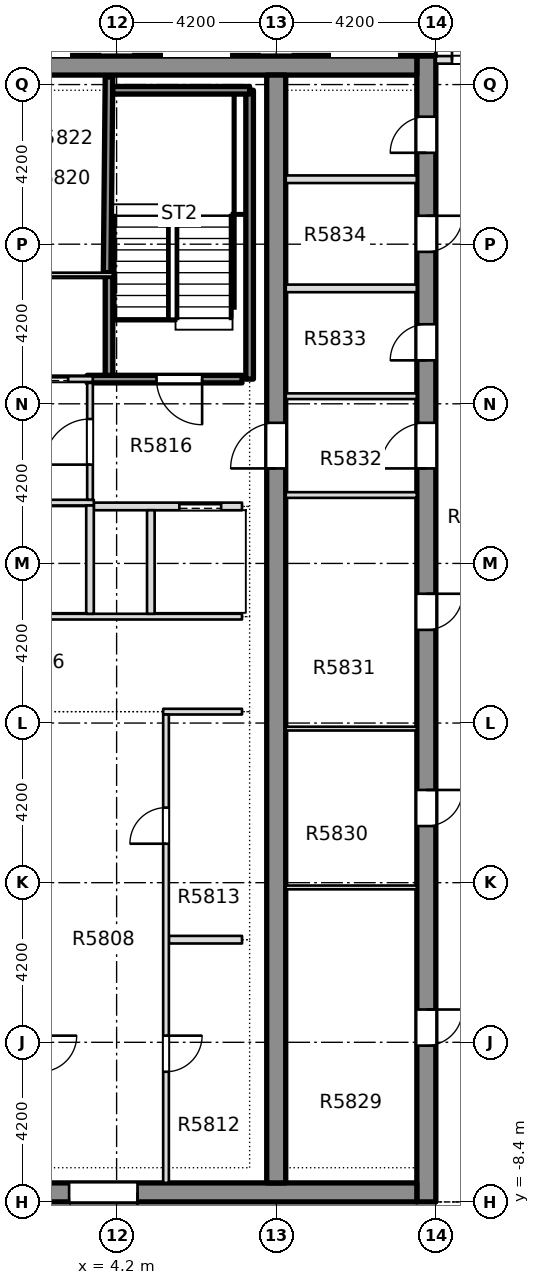
"""IFC4 building model, lengths in metres.
Left out: names, types, materials, properties, quantities, classifications, styles, units other than length and angle.
Written with IfcOpenShell. Run it as: python <this file> out.ifc"""

import sys

from ifc_helpers import new_model, si_unit, direction, frame, frame_2d, origin, place, context, subcontext, project, spatial, rectangle, extrude, element, fill, save


model = new_model("IFC4")
c1 = context("Model", 3, precision=1e-05, world=origin(), true_north=direction((0.0, 1.0)))
c2 = subcontext(c1, "Body", "Model", "MODEL_VIEW")
j1 = project(units=[si_unit("LENGTHUNIT", "METRE"), si_unit("PLANEANGLEUNIT", "RADIAN")], contexts=[c1])
p1 = place(None, origin())
s1 = spatial("IfcSite", under=j1, at=p1, CompositionType="ELEMENT")
p2 = place(p1, origin())
s2 = spatial("IfcBuilding", under=s1, at=p2, CompositionType="ELEMENT")
p3 = place(p2, frame((0.0, 0.0, 223.45)))
s3 = spatial("IfcBuildingStorey", under=s2, at=p3, CompositionType="ELEMENT", Elevation=223.45)
p4 = place(p3, frame((12.35, -8.4, -0.4), z_axis=(0.0, 0.0, 1.0), x_axis=(0.0, 1.0, 0.0)))
e1 = element("IfcWall", 1, at=p4, inside=s3, PredefinedType="SHEAR", context=c2, shape_type="SweptSolid", body=[
    extrude(rectangle(XDim=30.15, YDim=0.5, at=frame_2d((15.075, 0.0))), origin(), (0.0, 0.0, 1.0), 3.45),
])
p5 = place(p4, frame((4.113, 0.0, 0.4)))
e2 = element("IfcOpeningElement", 2, at=p5, cuts=e1, PredefinedType="OPENING", context=c2, shape_type="SweptSolid", body=[
    extrude(rectangle(XDim=0.95, YDim=2.1, at=frame_2d((0.475, 1.05))), frame((0.0, 0.26, 0.0), z_axis=(0.0, -1.0, 0.0), x_axis=(1.0, 0.0, 0.0)), (0.0, 0.0, 1.0), 0.52),
])
p6 = place(p4, frame((9.89, 0.0, 0.4)))
e3 = element("IfcOpeningElement", 3, at=p6, cuts=e1, PredefinedType="OPENING", context=c2, shape_type="SweptSolid", body=[
    extrude(rectangle(XDim=0.95, YDim=2.1, at=frame_2d((0.475, 1.05))), frame((0.0, 0.26, 0.0), z_axis=(0.0, -1.0, 0.0), x_axis=(1.0, 0.0, 0.0)), (0.0, 0.0, 1.0), 0.52),
])
p7 = place(p4, frame((15.052, 0.0, 0.4)))
e4 = element("IfcOpeningElement", 4, at=p7, cuts=e1, PredefinedType="OPENING", context=c2, shape_type="SweptSolid", body=[
    extrude(rectangle(XDim=0.95, YDim=2.1, at=frame_2d((0.475, 1.05))), frame((0.0, 0.26, 0.0), z_axis=(0.0, -1.0, 0.0), x_axis=(1.0, 0.0, 0.0)), (0.0, 0.0, 1.0), 0.52),
])
p8 = place(p4, frame((22.144, 0.0, 0.4)))
e5 = element("IfcOpeningElement", 5, at=p8, cuts=e1, PredefinedType="OPENING", context=c2, shape_type="SweptSolid", body=[
    extrude(rectangle(XDim=0.95, YDim=2.1, at=frame_2d((0.475, 1.05))), frame((0.0, 0.26, 0.0), z_axis=(0.0, -1.0, 0.0), x_axis=(1.0, 0.0, 0.0)), (0.0, 0.0, 1.0), 0.52),
])
p9 = place(p4, frame((24.998, 0.0, 0.4)))
e6 = element("IfcOpeningElement", 6, at=p9, cuts=e1, PredefinedType="OPENING", context=c2, shape_type="SweptSolid", body=[
    extrude(rectangle(XDim=0.95, YDim=2.1, at=frame_2d((0.475, 1.05))), frame((0.0, 0.26, 0.0), z_axis=(0.0, -1.0, 0.0), x_axis=(1.0, 0.0, 0.0)), (0.0, 0.0, 1.0), 0.52),
])
p10 = place(p4, frame((27.605, 0.0, 0.4)))
e7 = element("IfcOpeningElement", 7, at=p10, cuts=e1, PredefinedType="OPENING", context=c2, shape_type="SweptSolid", body=[
    extrude(rectangle(XDim=0.95, YDim=2.1, at=frame_2d((0.475, 1.05))), frame((0.0, 0.26, 0.0), z_axis=(0.0, -1.0, 0.0), x_axis=(1.0, 0.0, 0.0)), (0.0, 0.0, 1.0), 0.52),
])
p11 = place(p4, frame((19.3, 0.0, 0.4)))
e8 = element("IfcOpeningElement", 8, at=p11, cuts=e1, PredefinedType="OPENING", context=c2, shape_type="SweptSolid", body=[
    extrude(rectangle(XDim=1.2, YDim=2.1, at=frame_2d((0.6, 1.05))), frame((0.0, 0.26, 0.0), z_axis=(0.0, -1.0, 0.0), x_axis=(1.0, 0.0, 0.0)), (0.0, 0.0, 1.0), 0.52),
])
p12 = place(p3, frame((-12.1, -8.15, -0.4), z_axis=(0.0, 0.0, 1.0), x_axis=(1.0, 0.0, 0.0)))
e9 = element("IfcWall", 9, at=p12, inside=s3, PredefinedType="SHEAR", context=c2, shape_type="SweptSolid", body=[
    extrude(rectangle(XDim=24.2, YDim=0.5, at=frame_2d((12.1, 0.0))), origin(), (0.0, 0.0, 1.0), 3.45),
])
p13 = place(p12, frame((7.35, 0.0, 0.4)))
e10 = element("IfcOpeningElement", 10, at=p13, cuts=e9, PredefinedType="OPENING", context=c2, shape_type="SweptSolid", body=[
    extrude(rectangle(XDim=1.8, YDim=2.1, at=frame_2d((0.9, 1.05))), frame((0.0, 0.26, 0.0), z_axis=(0.0, -1.0, 0.0), x_axis=(1.0, 0.0, 0.0)), (0.0, 0.0, 1.0), 0.52),
])
p14 = place(p12, frame((15.05, 0.0, 0.4)))
e11 = element("IfcOpeningElement", 11, at=p14, cuts=e9, PredefinedType="OPENING", context=c2, shape_type="SweptSolid", body=[
    extrude(rectangle(XDim=1.8, YDim=2.1, at=frame_2d((0.9, 1.05))), frame((0.0, 0.26, 0.0), z_axis=(0.0, -1.0, 0.0), x_axis=(1.0, 0.0, 0.0)), (0.0, 0.0, 1.0), 0.52),
])
p15 = place(p3, frame((-12.1, 21.5, -0.4), z_axis=(0.0, 0.0, 1.0), x_axis=(1.0, 0.0, 0.0)))
e12 = element("IfcWall", 12, at=p15, inside=s3, PredefinedType="SHEAR", context=c2, shape_type="SweptSolid", body=[
    extrude(rectangle(XDim=24.2, YDim=0.5, at=frame_2d((12.1, 0.0))), origin(), (0.0, 0.0, 1.0), 3.45),
])
p16 = place(p3, frame((8.4, -7.9, -0.4), z_axis=(0.0, 0.0, 1.0), x_axis=(0.0, 1.0, 0.0)))
e13 = element("IfcWall", 13, at=p16, inside=s3, PredefinedType="SHEAR", context=c2, shape_type="SweptSolid", body=[
    extrude(rectangle(XDim=29.15, YDim=0.5, at=frame_2d((14.575, 0.0))), origin(), (0.0, 0.0, 1.0), 3.45),
])
p17 = place(p16, frame((18.8, 0.0, 0.4)))
e14 = element("IfcOpeningElement", 14, at=p17, cuts=e13, PredefinedType="OPENING", context=c2, shape_type="SweptSolid", body=[
    extrude(rectangle(XDim=1.2, YDim=2.1, at=frame_2d((0.6, 1.05))), frame((0.0, 0.26, 0.0), z_axis=(0.0, -1.0, 0.0), x_axis=(1.0, 0.0, 0.0)), (0.0, 0.0, 1.0), 0.52),
])
p18 = place(p3, frame((16.35, 21.65, 0.0), z_axis=(0.0, 0.0, 1.0), x_axis=(-1.0, 0.0, 0.0)))
e15 = element("IfcWall", 15, at=p18, inside=s3, PredefinedType="STANDARD", context=c2, shape_type="SweptSolid", body=[
    extrude(rectangle(XDim=3.75, YDim=0.2, at=frame_2d((1.875, 0.0))), origin(), (0.0, 0.0, 1.0), 3.05),
])
p19 = place(p18, frame((2.325, 0.0, 0.0)))
e16 = element("IfcOpeningElement", 16, at=p19, cuts=e15, PredefinedType="OPENING", context=c2, shape_type="SweptSolid", body=[
    extrude(rectangle(XDim=1.0, YDim=2.4, at=frame_2d((0.5, 1.2))), frame((0.0, 0.11, 0.0), z_axis=(0.0, -1.0, 0.0), x_axis=(1.0, 0.0, 0.0)), (0.0, 0.0, 1.0), 0.22),
])
p20 = place(p3, frame((5.575, -1.5, 0.0), z_axis=(0.0, 0.0, 1.0), x_axis=(1.0, 0.0, 0.0)))
e17 = element("IfcWall", 17, at=p20, inside=s3, PredefinedType="PARTITIONING", context=c2, shape_type="SweptSolid", body=[
    extrude(rectangle(XDim=1.925, YDim=0.2, at=frame_2d((0.962, 0.0))), origin(), (0.0, 0.0, 1.0), 3.05),
])
p21 = place(p3, frame((5.425, 4.5, 0.0), z_axis=(0.0, 0.0, 1.0), x_axis=(1.0, 0.0, 0.0)))
e18 = element("IfcWall", 18, at=p21, inside=s3, PredefinedType="PARTITIONING", context=c2, shape_type="SweptSolid", body=[
    extrude(rectangle(XDim=2.075, YDim=0.15, at=frame_2d((1.038, 0.0))), origin(), (0.0, 0.0, 1.0), 3.05),
])
p22 = place(p3, frame((-7.5, 7.0, 0.0), z_axis=(0.0, 0.0, 1.0), x_axis=(1.0, 0.0, 0.0)))
e19 = element("IfcWall", 19, at=p22, inside=s3, PredefinedType="PARTITIONING", context=c2, shape_type="SweptSolid", body=[
    extrude(rectangle(XDim=15.0, YDim=0.15, at=frame_2d((7.5, 0.0))), origin(), (0.0, 0.0, 1.0), 3.05),
])
p23 = place(p22, frame((6.8, 0.0, 0.0)))
e20 = element("IfcOpeningElement", 20, at=p23, cuts=e19, PredefinedType="OPENING", context=c2, shape_type="SweptSolid", body=[
    extrude(rectangle(XDim=1.4, YDim=2.1, at=frame_2d((0.7, 1.05))), frame((0.0, 0.085, 0.0), z_axis=(0.0, -1.0, 0.0), x_axis=(1.0, 0.0, 0.0)), (0.0, 0.0, 1.0), 0.17),
])
p24 = place(p3, frame((3.6, 9.9, 0.0), z_axis=(0.0, 0.0, 1.0), x_axis=(1.0, 0.0, 0.0)))
e21 = element("IfcWall", 21, at=p24, inside=s3, PredefinedType="PARTITIONING", context=c2, shape_type="SweptSolid", body=[
    extrude(rectangle(XDim=3.9, YDim=0.2, at=frame_2d((1.95, 0.0))), origin(), (0.0, 0.0, 1.0), 3.05),
])
p25 = place(p24, frame((2.25, 0.0, 0.0)))
e22 = element("IfcOpeningElement", 22, at=p25, cuts=e21, PredefinedType="OPENING", context=c2, shape_type="SweptSolid", body=[
    extrude(rectangle(XDim=1.1, YDim=2.1, at=frame_2d((0.55, 1.05))), frame((0.0, 0.11, 0.0), z_axis=(0.0, -1.0, 0.0), x_axis=(1.0, 0.0, 0.0)), (0.0, 0.0, 1.0), 0.22),
])
p26 = place(p3, frame((-3.6, 10.0, 0.0), z_axis=(0.0, 0.0, 1.0), x_axis=(1.0, 0.0, 0.0)))
e23 = element("IfcWall", 23, at=p26, inside=s3, PredefinedType="PARTITIONING", context=c2, shape_type="SweptSolid", body=[
    extrude(rectangle(XDim=7.2, YDim=0.15, at=frame_2d((3.6, 0.0))), origin(), (0.0, 0.0, 1.0), 3.05),
])
p27 = place(p26, frame((2.9, 0.0, 0.0)))
e24 = element("IfcOpeningElement", 24, at=p27, cuts=e23, PredefinedType="OPENING", context=c2, shape_type="SweptSolid", body=[
    extrude(rectangle(XDim=1.4, YDim=2.1, at=frame_2d((0.7, 1.05))), frame((0.0, 0.085, 0.0), z_axis=(0.0, -1.0, 0.0), x_axis=(1.0, 0.0, 0.0)), (0.0, 0.0, 1.0), 0.17),
])
p28 = place(p3, frame((-3.575, 13.25, 0.0), z_axis=(0.0, 0.0, 1.0), x_axis=(1.0, 0.0, 0.0)))
e25 = element("IfcWall", 25, at=p28, inside=s3, PredefinedType="PARTITIONING", context=c2, shape_type="SweptSolid", body=[
    extrude(rectangle(XDim=7.15, YDim=0.15, at=frame_2d((3.575, 0.0))), origin(), (0.0, 0.0, 1.0), 3.05),
])
p29 = place(p28, frame((0.6, 0.0, 0.0)))
e26 = element("IfcOpeningElement", 26, at=p29, cuts=e25, PredefinedType="OPENING", context=c2, shape_type="SweptSolid", body=[
    extrude(rectangle(XDim=1.2, YDim=2.1, at=frame_2d((0.6, 1.05))), frame((0.0, 0.085, 0.0), z_axis=(0.0, -1.0, 0.0), x_axis=(1.0, 0.0, 0.0)), (0.0, 0.0, 1.0), 0.17),
])
p30 = place(p28, frame((5.4, 0.0, 0.0)))
e27 = element("IfcOpeningElement", 27, at=p30, cuts=e25, PredefinedType="OPENING", context=c2, shape_type="SweptSolid", body=[
    extrude(rectangle(XDim=1.1, YDim=2.1, at=frame_2d((0.55, 1.05))), frame((0.0, 0.085, 0.0), z_axis=(0.0, -1.0, 0.0), x_axis=(1.0, 0.0, 0.0)), (0.0, 0.0, 1.0), 0.17),
])
p31 = place(p28, frame((2.975, 0.0, 0.0)))
e28 = element("IfcOpeningElement", 28, at=p31, cuts=e25, PredefinedType="OPENING", context=c2, shape_type="SweptSolid", body=[
    extrude(rectangle(XDim=1.2, YDim=2.1, at=frame_2d((0.6, 1.05))), frame((0.0, 0.085, 0.0), z_axis=(0.0, -1.0, 0.0), x_axis=(1.0, 0.0, 0.0)), (0.0, 0.0, 1.0), 0.17),
])
p32 = place(p3, frame((3.425, 13.25, 0.0), z_axis=(0.0, 0.0, 1.0), x_axis=(1.0, 0.0, 0.0)))
e29 = element("IfcWall", 29, at=p32, inside=s3, PredefinedType="SOLIDWALL", context=c2, shape_type="SweptSolid", body=[
    extrude(rectangle(XDim=4.075, YDim=0.2, at=frame_2d((2.038, 0.0))), origin(), (0.0, 0.0, 1.0), 3.05),
])
p33 = place(p32, frame((1.825, 0.0, 0.0)))
e30 = element("IfcOpeningElement", 30, at=p33, cuts=e29, PredefinedType="OPENING", context=c2, shape_type="SweptSolid", body=[
    extrude(rectangle(XDim=1.2, YDim=2.1, at=frame_2d((0.6, 1.05))), frame((0.0, 0.11, 0.0), z_axis=(0.0, -1.0, 0.0), x_axis=(1.0, 0.0, 0.0)), (0.0, 0.0, 1.0), 0.22),
])
p34 = place(p3, frame((0.65, 16.0, 0.0), z_axis=(0.0, 0.0, 1.0), x_axis=(1.0, 0.0, 0.0)))
e31 = element("IfcWall", 31, at=p34, inside=s3, PredefinedType="PARTITIONING", context=c2, shape_type="SweptSolid", body=[
    extrude(rectangle(XDim=3.45, YDim=0.1, at=frame_2d((1.725, 0.0))), origin(), (0.0, 0.0, 1.0), 3.05),
])
p35 = place(p3, frame((3.5, 7.075, 0.0), z_axis=(0.0, 0.0, 1.0), x_axis=(0.0, 1.0, 0.0)))
e32 = element("IfcWall", 32, at=p35, inside=s3, PredefinedType="PARTITIONING", context=c2, shape_type="SweptSolid", body=[
    extrude(rectangle(XDim=2.85, YDim=0.2, at=frame_2d((1.425, 0.0))), origin(), (0.0, 0.0, 1.0), 3.05),
])
p36 = place(p3, frame((3.5, 10.075, 0.0), z_axis=(0.0, 0.0, 1.0), x_axis=(0.0, 1.0, 0.0)))
e33 = element("IfcWall", 33, at=p36, inside=s3, PredefinedType="PARTITIONING", context=c2, shape_type="SweptSolid", body=[
    extrude(rectangle(XDim=3.075, YDim=0.15, at=frame_2d((1.538, 0.0))), origin(), (0.0, 0.0, 1.0), 3.05),
])
p37 = place(p36, frame((0.925, 0.0, 0.0)))
e34 = element("IfcOpeningElement", 34, at=p37, cuts=e33, PredefinedType="OPENING", context=c2, shape_type="SweptSolid", body=[
    extrude(rectangle(XDim=1.2, YDim=2.1, at=frame_2d((0.6, 1.05))), frame((0.0, 0.085, 0.0), z_axis=(0.0, -1.0, 0.0), x_axis=(1.0, 0.0, 0.0)), (0.0, 0.0, 1.0), 0.17),
])
p38 = place(p3, frame((4.0, 13.35, 0.0), z_axis=(0.0, 0.0, 1.0), x_axis=(0.0, 1.0, 0.0)))
e35 = element("IfcWall", 35, at=p38, inside=s3, PredefinedType="SOLIDWALL", context=c2, shape_type="SweptSolid", body=[
    extrude(rectangle(XDim=2.6, YDim=0.2, at=frame_2d((1.3, 0.0))), origin(), (0.0, 0.0, 1.0), 3.05),
])
p39 = place(p3, frame((3.95, 16.05, 0.0), z_axis=(0.0, 0.0, 1.0), x_axis=(0.009719787395, 0.999952761751, 0.0)))
e36 = element("IfcWall", 36, at=p39, inside=s3, PredefinedType="SOLIDWALL", context=c2, shape_type="SweptSolid", body=[
    extrude(rectangle(XDim=5.149, YDim=0.2, at=frame_2d((2.575, 0.0))), origin(), (0.0, 0.0, 1.0), 3.05),
])
p40 = place(p3, frame((5.1, 7.075, 0.0), z_axis=(0.0, 0.0, 1.0), x_axis=(0.0, 1.0, 0.0)))
e37 = element("IfcWall", 37, at=p40, inside=s3, PredefinedType="PARTITIONING", context=c2, shape_type="SweptSolid", body=[
    extrude(rectangle(XDim=2.725, YDim=0.2, at=frame_2d((1.363, 0.0))), origin(), (0.0, 0.0, 1.0), 3.05),
])
p41 = place(p3, frame((5.5, -7.899, 0.0), z_axis=(0.0, 0.0, 1.0), x_axis=(0.0, 1.0, 0.0)))
e38 = element("IfcWall", 38, at=p41, inside=s3, PredefinedType="PARTITIONING", context=c2, shape_type="SweptSolid", body=[
    extrude(rectangle(XDim=12.324, YDim=0.15, at=frame_2d((6.162, 0.0))), origin(), (0.0, 0.0, 1.0), 3.05),
])
p42 = place(p41, frame((2.924, 0.0, 0.0)))
e39 = element("IfcOpeningElement", 39, at=p42, cuts=e38, PredefinedType="OPENING", context=c2, shape_type="SweptSolid", body=[
    extrude(rectangle(XDim=0.95, YDim=2.1, at=frame_2d((0.475, 1.05))), frame((0.0, 0.085, 0.0), z_axis=(0.0, -1.0, 0.0), x_axis=(1.0, 0.0, 0.0)), (0.0, 0.0, 1.0), 0.17),
])
p43 = place(p41, frame((8.924, 0.0, 0.0)))
e40 = element("IfcOpeningElement", 40, at=p43, cuts=e38, PredefinedType="OPENING", context=c2, shape_type="SweptSolid", body=[
    extrude(rectangle(XDim=0.95, YDim=2.1, at=frame_2d((0.475, 1.05))), frame((0.0, 0.085, 0.0), z_axis=(0.0, -1.0, 0.0), x_axis=(1.0, 0.0, 0.0)), (0.0, 0.0, 1.0), 0.17),
])
for number, where, z_axis, x_axis in (
    (41, (8.651, -0.125, 0.0), (0.0, 0.0, 1.0), (1.0, 0.0, 0.0)),
    (42, (8.651, 4.054, 0.0), (0.0, 0.0, 1.0), (1.0, 0.0, 0.0)),
):
    element("IfcWall", number, at=place(p3, frame(where, z_axis=z_axis, x_axis=x_axis)), inside=s3, PredefinedType="PARTITIONING", context=c2, shape_type="SweptSolid", body=[
        extrude(rectangle(XDim=3.448, YDim=0.1, at=frame_2d((1.724, 0.0))), origin(), (0.0, 0.0, 1.0), 3.05),
    ])
for number, where, z_axis, x_axis in (
    (43, (8.651, 10.2, 0.0), (0.0, 0.0, 1.0), (1.0, 0.0, 0.0)),
    (44, (8.651, 12.8, 0.0), (0.0, 0.0, 1.0), (1.0, 0.0, 0.0)),
):
    element("IfcWall", number, at=place(p3, frame(where, z_axis=z_axis, x_axis=x_axis)), inside=s3, PredefinedType="PARTITIONING", context=c2, shape_type="SweptSolid", body=[
        extrude(rectangle(XDim=3.448, YDim=0.15, at=frame_2d((1.724, 0.0))), origin(), (0.0, 0.0, 1.0), 3.05),
    ])
for number, where, z_axis, x_axis in (
    (45, (8.651, 15.637, 0.0), (0.0, 0.0, 1.0), (1.0, 0.0, 0.0)),
    (46, (8.651, 18.509, 0.0), (0.0, 0.0, 1.0), (1.0, 0.0, 0.0)),
):
    element("IfcWall", number, at=place(p3, frame(where, z_axis=z_axis, x_axis=x_axis)), inside=s3, PredefinedType="PARTITIONING", context=c2, shape_type="SweptSolid", body=[
        extrude(rectangle(XDim=3.448, YDim=0.2, at=frame_2d((1.724, 0.0))), origin(), (0.0, 0.0, 1.0), 3.05),
    ])
p44 = place(p3, frame((7.7, 13.25, 0.0), z_axis=(0.0, 0.0, 1.0), x_axis=(0.0, 1.0, 0.0)))
e47 = element("IfcWall", 47, at=p44, inside=s3, PredefinedType="SOLIDWALL", context=c2, shape_type="SweptSolid", body=[
    extrude(rectangle(XDim=7.6, YDim=0.2, at=frame_2d((3.8, 0.0))), origin(), (0.0, 0.0, 1.0), 3.05),
])
p45 = place(p3, frame((4.1, 20.85, 0.0), z_axis=(0.0, 0.0, 1.0), x_axis=(1.0, 0.0, 0.0)))
e48 = element("IfcWall", 48, at=p45, inside=s3, PredefinedType="SOLIDWALL", context=c2, shape_type="SweptSolid", body=[
    extrude(rectangle(XDim=3.6, YDim=0.2, at=frame_2d((1.8, 0.0))), origin(), (0.0, 0.0, 1.0), 3.05),
])
p46 = place(p19, origin())
e49 = element("IfcDoor", 49, at=p46, inside=s3, OperationType="SINGLE_SWING_LEFT", PredefinedType="DOOR", context=c2, shape_type="SweptSolid", body=[
    extrude(rectangle(XDim=1.0, YDim=2.4, at=frame_2d((0.5, 1.2))), frame((0.0, 0.025, 0.0), z_axis=(0.0, -1.0, 0.0), x_axis=(1.0, 0.0, 0.0)), (0.0, 0.0, 1.0), 0.05),
])
fill(e16, e49)
p47 = place(p42, origin())
e50 = element("IfcDoor", 50, at=p47, inside=s3, OperationType="SINGLE_SWING_LEFT", PredefinedType="DOOR", context=c2, shape_type="SweptSolid", body=[
    extrude(rectangle(XDim=0.95, YDim=2.1, at=frame_2d((0.475, 1.05))), frame((0.0, 0.025, 0.0), z_axis=(0.0, -1.0, 0.0), x_axis=(1.0, 0.0, 0.0)), (0.0, 0.0, 1.0), 0.05),
])
fill(e39, e50)
p48 = place(p43, origin())
e51 = element("IfcDoor", 51, at=p48, inside=s3, OperationType="SINGLE_SWING_LEFT", PredefinedType="DOOR", context=c2, shape_type="SweptSolid", body=[
    extrude(rectangle(XDim=0.95, YDim=2.1, at=frame_2d((0.475, 1.05))), frame((0.0, 0.025, 0.0), z_axis=(0.0, -1.0, 0.0), x_axis=(1.0, 0.0, 0.0)), (0.0, 0.0, 1.0), 0.05),
])
fill(e40, e51)
p49 = place(p33, origin())
e52 = element("IfcDoor", 52, at=p49, inside=s3, OperationType="SINGLE_SWING_RIGHT", PredefinedType="DOOR", context=c2, shape_type="SweptSolid", body=[
    extrude(rectangle(XDim=1.2, YDim=2.1, at=frame_2d((0.6, 1.05))), frame((0.0, 0.025, 0.0), z_axis=(0.0, -1.0, 0.0), x_axis=(1.0, 0.0, 0.0)), (0.0, 0.0, 1.0), 0.05),
])
fill(e30, e52)
p50 = place(p25, origin())
e53 = element("IfcDoor", 53, at=p50, inside=s3, OperationType="SLIDING_TO_LEFT", PredefinedType="DOOR", context=c2, shape_type="SweptSolid", body=[
    extrude(rectangle(XDim=1.1, YDim=2.1, at=frame_2d((0.55, 1.05))), frame((0.0, 0.025, 0.0), z_axis=(0.0, -1.0, 0.0), x_axis=(1.0, 0.0, 0.0)), (0.0, 0.0, 1.0), 0.05),
])
fill(e22, e53)
p51 = place(p30, origin())
e54 = element("IfcDoor", 54, at=p51, inside=s3, OperationType="SLIDING_TO_LEFT", PredefinedType="DOOR", context=c2, shape_type="SweptSolid", body=[
    extrude(rectangle(XDim=1.1, YDim=2.1, at=frame_2d((0.55, 1.05))), frame((0.0, 0.025, 0.0), z_axis=(0.0, -1.0, 0.0), x_axis=(1.0, 0.0, 0.0)), (0.0, 0.0, 1.0), 0.05),
])
fill(e27, e54)
p52 = place(p37, origin())
e55 = element("IfcDoor", 55, at=p52, inside=s3, OperationType="SINGLE_SWING_LEFT", PredefinedType="DOOR", context=c2, shape_type="SweptSolid", body=[
    extrude(rectangle(XDim=1.2, YDim=2.1, at=frame_2d((0.6, 1.05))), frame((0.0, 0.025, 0.0), z_axis=(0.0, -1.0, 0.0), x_axis=(1.0, 0.0, 0.0)), (0.0, 0.0, 1.0), 0.05),
])
fill(e34, e55)
p53 = place(p14, origin())
e56 = element("IfcDoor", 56, at=p53, inside=s3, OperationType="SINGLE_SWING_LEFT", PredefinedType="DOOR", context=c2, shape_type="SweptSolid", body=[
    extrude(rectangle(XDim=1.8, YDim=2.1, at=frame_2d((0.9, 1.05))), frame((0.0, 0.025, 0.0), z_axis=(0.0, -1.0, 0.0), x_axis=(1.0, 0.0, 0.0)), (0.0, 0.0, 1.0), 0.05),
])
fill(e11, e56)
p54 = place(p5, origin())
e57 = element("IfcDoor", 57, at=p54, inside=s3, OperationType="SINGLE_SWING_LEFT", PredefinedType="DOOR", context=c2, shape_type="SweptSolid", body=[
    extrude(rectangle(XDim=0.95, YDim=2.1, at=frame_2d((0.475, 1.05))), frame((0.0, 0.025, 0.0), z_axis=(0.0, -1.0, 0.0), x_axis=(1.0, 0.0, 0.0)), (0.0, 0.0, 1.0), 0.05),
])
fill(e2, e57)
p55 = place(p6, origin())
e58 = element("IfcDoor", 58, at=p55, inside=s3, OperationType="SINGLE_SWING_LEFT", PredefinedType="DOOR", context=c2, shape_type="SweptSolid", body=[
    extrude(rectangle(XDim=0.95, YDim=2.1, at=frame_2d((0.475, 1.05))), frame((0.0, 0.025, 0.0), z_axis=(0.0, -1.0, 0.0), x_axis=(1.0, 0.0, 0.0)), (0.0, 0.0, 1.0), 0.05),
])
fill(e3, e58)
p56 = place(p7, origin())
e59 = element("IfcDoor", 59, at=p56, inside=s3, OperationType="SINGLE_SWING_LEFT", PredefinedType="DOOR", context=c2, shape_type="SweptSolid", body=[
    extrude(rectangle(XDim=0.95, YDim=2.1, at=frame_2d((0.475, 1.05))), frame((0.0, 0.025, 0.0), z_axis=(0.0, -1.0, 0.0), x_axis=(1.0, 0.0, 0.0)), (0.0, 0.0, 1.0), 0.05),
])
fill(e4, e59)
p57 = place(p8, origin())
e60 = element("IfcDoor", 60, at=p57, inside=s3, OperationType="SINGLE_SWING_LEFT", PredefinedType="DOOR", context=c2, shape_type="SweptSolid", body=[
    extrude(rectangle(XDim=0.95, YDim=2.1, at=frame_2d((0.475, 1.05))), frame((0.0, 0.025, 0.0), z_axis=(0.0, -1.0, 0.0), x_axis=(1.0, 0.0, 0.0)), (0.0, 0.0, 1.0), 0.05),
])
fill(e5, e60)
p58 = place(p9, origin())
e61 = element("IfcDoor", 61, at=p58, inside=s3, OperationType="SINGLE_SWING_LEFT", PredefinedType="DOOR", context=c2, shape_type="SweptSolid", body=[
    extrude(rectangle(XDim=0.95, YDim=2.1, at=frame_2d((0.475, 1.05))), frame((0.0, 0.025, 0.0), z_axis=(0.0, -1.0, 0.0), x_axis=(1.0, 0.0, 0.0)), (0.0, 0.0, 1.0), 0.05),
])
fill(e6, e61)
p59 = place(p10, origin())
e62 = element("IfcDoor", 62, at=p59, inside=s3, OperationType="SINGLE_SWING_LEFT", PredefinedType="DOOR", context=c2, shape_type="SweptSolid", body=[
    extrude(rectangle(XDim=0.95, YDim=2.1, at=frame_2d((0.475, 1.05))), frame((0.0, 0.025, 0.0), z_axis=(0.0, -1.0, 0.0), x_axis=(1.0, 0.0, 0.0)), (0.0, 0.0, 1.0), 0.05),
])
fill(e7, e62)
p60 = place(p11, origin())
e63 = element("IfcDoor", 63, at=p60, inside=s3, OperationType="SINGLE_SWING_LEFT", PredefinedType="DOOR", context=c2, shape_type="SweptSolid", body=[
    extrude(rectangle(XDim=1.2, YDim=2.1, at=frame_2d((0.6, 1.05))), frame((0.0, 0.025, 0.0), z_axis=(0.0, -1.0, 0.0), x_axis=(1.0, 0.0, 0.0)), (0.0, 0.0, 1.0), 0.05),
])
fill(e8, e63)
p61 = place(p17, origin())
e64 = element("IfcDoor", 64, at=p61, inside=s3, OperationType="SINGLE_SWING_LEFT", PredefinedType="DOOR", context=c2, shape_type="SweptSolid", body=[
    extrude(rectangle(XDim=1.2, YDim=2.1, at=frame_2d((0.6, 1.05))), frame((0.0, 0.025, 0.0), z_axis=(0.0, -1.0, 0.0), x_axis=(1.0, 0.0, 0.0)), (0.0, 0.0, 1.0), 0.05),
])
fill(e14, e64)
save(model, sys.argv[1])
